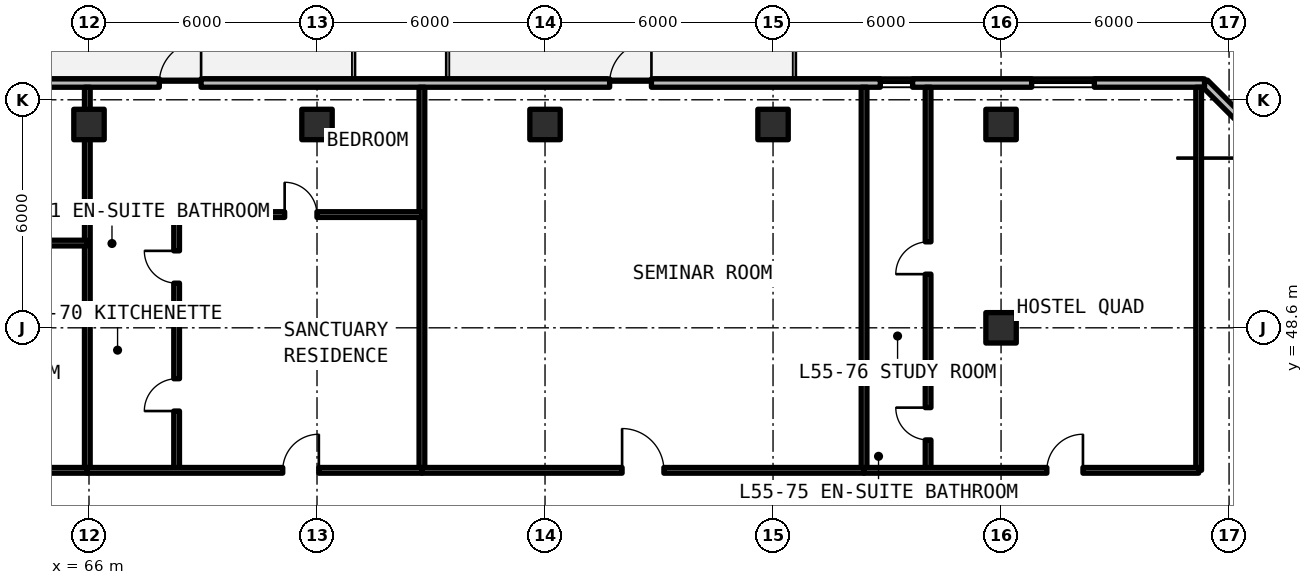
"""IFC4 building model, lengths in metres.
Left out: names, types, materials, properties, quantities, classifications, styles, units other than length and angle.
Written with IfcOpenShell. Run it as: python <this file> out.ifc"""

import sys

from ifc_helpers import new_model, si_unit, direction, frame, frame_2d, origin, origin_2d, place, context, subcontext, project, spatial, rectangle, extrude, element, fill, save


model = new_model("IFC4")
c1 = context("Model", 3, precision=1e-05, world=origin(), true_north=direction((0.0, 1.0)))
c2 = subcontext(c1, "Body", "Model", "MODEL_VIEW")
j1 = project(units=[si_unit("LENGTHUNIT", "METRE"), si_unit("PLANEANGLEUNIT", "RADIAN")], contexts=[c1])
p1 = place(None, origin())
s1 = spatial("IfcSite", under=j1, at=p1, CompositionType="ELEMENT")
p2 = place(p1, origin())
s2 = spatial("IfcBuilding", under=s1, at=p2, CompositionType="ELEMENT")
p3 = place(p2, frame((0.0, 0.0, 198.33)))
s3 = spatial("IfcBuildingStorey", under=s2, at=p3, CompositionType="ELEMENT", Elevation=198.33)
for number, where, z_axis, x_axis in (
    (1, (90.0, 48.6, 0.0), (0.0, 0.0, 1.0), (1.0, 0.0, 0.0)),
    (2, (66.0, 53.95, 0.0), (0.0, 0.0, 1.0), (1.0, 0.0, 0.0)),
    (3, (72.0, 53.95, 0.0), (0.0, 0.0, 1.0), (1.0, 0.0, 0.0)),
    (4, (78.0, 53.95, 0.0), (0.0, 0.0, 1.0), (1.0, 0.0, 0.0)),
    (5, (84.0, 53.95, 0.0), (0.0, 0.0, 1.0), (1.0, 0.0, 0.0)),
    (6, (90.0, 53.95, 0.0), (0.0, 0.0, 1.0), (1.0, 0.0, 0.0)),
):
    element("IfcColumn", number, at=place(p3, frame(where, z_axis=z_axis, x_axis=x_axis)), inside=s3, PredefinedType="COLUMN", context=c2, shape_type="SweptSolid", body=[
        extrude(rectangle(XDim=0.8, YDim=0.8, at=origin_2d()), origin(), (0.0, 0.0, 1.0), 3.3),
    ])
p4 = place(p3, frame((99.49, 50.904, 0.0), z_axis=(0.0, 0.0, 1.0), x_axis=(-0.707085909342, 0.707127652415, 0.0)))
e7 = element("IfcWall", 7, at=p4, inside=s3, PredefinedType="SOLIDWALL", context=c2, shape_type="SweptSolid", body=[
    extrude(rectangle(XDim=5.849, YDim=0.22, at=frame_2d((2.924, 0.0))), origin(), (0.0, 0.0, 1.0), 3.08),
])
p5 = place(p4, frame((1.224, 0.0, 0.78)))
e8 = element("IfcOpeningElement", 8, at=p5, cuts=e7, PredefinedType="OPENING", context=c2, shape_type="SweptSolid", body=[
    extrude(rectangle(XDim=3.4, YDim=1.66, at=frame_2d((1.7, 0.83))), frame((0.0, 0.12, 0.0), z_axis=(0.0, -1.0, 0.0), x_axis=(1.0, 0.0, 0.0)), (0.0, 0.0, 1.0), 0.24),
])
p6 = place(p3, frame((95.354, 55.04, 0.0), z_axis=(0.0, 0.0, 1.0), x_axis=(-1.0, 0.0, 0.0)))
e9 = element("IfcWall", 9, at=p6, inside=s3, PredefinedType="SOLIDWALL", context=c2, shape_type="SweptSolid", body=[
    extrude(rectangle(XDim=43.244, YDim=0.22, at=frame_2d((21.622, 0.0))), origin(), (0.0, 0.0, 1.0), 3.08),
])
p7 = place(p6, frame((26.404, 0.0, 0.0)))
e10 = element("IfcOpeningElement", 10, at=p7, cuts=e9, PredefinedType="OPENING", context=c2, shape_type="SweptSolid", body=[
    extrude(rectangle(XDim=1.1, YDim=2.15, at=frame_2d((0.55, 1.075))), frame((0.0, 0.12, 0.0), z_axis=(0.0, -1.0, 0.0), x_axis=(1.0, 0.0, 0.0)), (0.0, 0.0, 1.0), 0.24),
])
p8 = place(p6, frame((14.554, 0.0, 0.0)))
e11 = element("IfcOpeningElement", 11, at=p8, cuts=e9, PredefinedType="OPENING", context=c2, shape_type="SweptSolid", body=[
    extrude(rectangle(XDim=1.1, YDim=2.15, at=frame_2d((0.55, 1.075))), frame((0.0, 0.12, 0.0), z_axis=(0.0, -1.0, 0.0), x_axis=(1.0, 0.0, 0.0)), (0.0, 0.0, 1.0), 0.24),
])
p9 = place(p6, frame((38.802, 0.0, 0.78)))
e12 = element("IfcOpeningElement", 12, at=p9, cuts=e9, PredefinedType="OPENING", context=c2, shape_type="SweptSolid", body=[
    extrude(rectangle(XDim=1.65, YDim=1.66, at=frame_2d((0.825, 0.83))), frame((0.0, 0.12, 0.0), z_axis=(0.0, -1.0, 0.0), x_axis=(1.0, 0.0, 0.0)), (0.0, 0.0, 1.0), 0.24),
])
p10 = place(p6, frame((31.904, 0.0, 0.78)))
e13 = element("IfcOpeningElement", 13, at=p10, cuts=e9, PredefinedType="OPENING", context=c2, shape_type="SweptSolid", body=[
    extrude(rectangle(XDim=1.65, YDim=1.66, at=frame_2d((0.825, 0.83))), frame((0.0, 0.12, 0.0), z_axis=(0.0, -1.0, 0.0), x_axis=(1.0, 0.0, 0.0)), (0.0, 0.0, 1.0), 0.24),
])
p11 = place(p6, frame((7.682, 0.0, 0.78)))
e14 = element("IfcOpeningElement", 14, at=p11, cuts=e9, PredefinedType="OPENING", context=c2, shape_type="SweptSolid", body=[
    extrude(rectangle(XDim=0.85, YDim=1.65, at=frame_2d((0.425, 0.825))), frame((0.0, 0.12, 0.0), z_axis=(0.0, -1.0, 0.0), x_axis=(1.0, 0.0, 0.0)), (0.0, 0.0, 1.0), 0.24),
])
p12 = place(p6, frame((2.899, 0.0, 0.78)))
e15 = element("IfcOpeningElement", 15, at=p12, cuts=e9, PredefinedType="OPENING", context=c2, shape_type="SweptSolid", body=[
    extrude(rectangle(XDim=1.65, YDim=1.66, at=frame_2d((0.825, 0.83))), frame((0.0, 0.12, 0.0), z_axis=(0.0, -1.0, 0.0), x_axis=(1.0, 0.0, 0.0)), (0.0, 0.0, 1.0), 0.24),
])
for number, where, z_axis, x_axis in (
    (16, (95.2, 44.85, 0.0), (0.0, 0.0, 1.0), (0.0, 1.0, 0.0)),
    (17, (65.956, 44.85, 0.0), (0.0, 0.0, 1.0), (0.0, 1.0, 0.0)),
):
    element("IfcWall", number, at=place(p3, frame(where, z_axis=z_axis, x_axis=x_axis)), inside=s3, PredefinedType="SOLIDWALL", context=c2, shape_type="SweptSolid", body=[
        extrude(rectangle(XDim=10.08, YDim=0.15, at=frame_2d((5.04, 0.0))), origin(), (0.0, 0.0, 1.0), 2.35),
    ])
p13 = place(p3, frame((52.12, 50.83, 0.0), z_axis=(0.0, 0.0, 1.0), x_axis=(1.0, 0.0, 0.0)))
e18 = element("IfcWall", 18, at=p13, inside=s3, PredefinedType="PARTITIONING", context=c2, shape_type="SweptSolid", body=[
    extrude(rectangle(XDim=13.836, YDim=0.15, at=frame_2d((6.918, 0.0))), origin(), (0.0, 0.0, 1.0), 2.35),
])
p14 = place(p13, frame((5.073, 0.0, 0.0)))
e19 = element("IfcOpeningElement", 19, at=p14, cuts=e18, PredefinedType="OPENING", context=c2, shape_type="SweptSolid", body=[
    extrude(rectangle(XDim=0.85, YDim=2.1, at=frame_2d((0.425, 1.05))), frame((0.0, 0.085, 0.0), z_axis=(0.0, -1.0, 0.0), x_axis=(1.0, 0.0, 0.0)), (0.0, 0.0, 1.0), 0.17),
])
p15 = place(p13, frame((10.09, 0.0, 0.0)))
e20 = element("IfcOpeningElement", 20, at=p15, cuts=e18, PredefinedType="OPENING", context=c2, shape_type="SweptSolid", body=[
    extrude(rectangle(XDim=0.85, YDim=2.1, at=frame_2d((0.425, 1.05))), frame((0.0, 0.085, 0.0), z_axis=(0.0, -1.0, 0.0), x_axis=(1.0, 0.0, 0.0)), (0.0, 0.0, 1.0), 0.17),
])
p16 = place(p3, frame((52.12, 44.85, 0.0), z_axis=(0.0, 0.0, 1.0), x_axis=(1.0, 0.0, 0.0)))
e21 = element("IfcWall", 21, at=p16, inside=s3, PredefinedType="SOLIDWALL", context=c2, shape_type="SweptSolid", body=[
    extrude(rectangle(XDim=13.836, YDim=0.15, at=frame_2d((6.918, 0.0))), origin(), (0.0, 0.0, 1.0), 2.35),
])
p17 = place(p16, frame((8.383, 0.0, 0.0)))
e22 = element("IfcOpeningElement", 22, at=p17, cuts=e21, PredefinedType="OPENING", context=c2, shape_type="SweptSolid", body=[
    extrude(rectangle(XDim=0.95, YDim=2.15, at=frame_2d((0.475, 1.075))), frame((0.0, 0.085, 0.0), z_axis=(0.0, -1.0, 0.0), x_axis=(1.0, 0.0, 0.0)), (0.0, 0.0, 1.0), 0.17),
])
p18 = place(p3, frame((74.76, 44.85, 0.0), z_axis=(0.0, 0.0, 1.0), x_axis=(0.0, 1.0, 0.0)))
e23 = element("IfcWall", 23, at=p18, inside=s3, PredefinedType="SOLIDWALL", context=c2, shape_type="SweptSolid", body=[
    extrude(rectangle(XDim=10.08, YDim=0.15, at=frame_2d((5.04, 0.0))), origin(), (0.0, 0.0, 1.0), 2.35),
])
p19 = place(p3, frame((65.956, 48.82, 0.0), z_axis=(0.0, 0.0, 1.0), x_axis=(1.0, 0.0, 0.0)))
e24 = element("IfcWall", 24, at=p19, inside=s3, PredefinedType="PARTITIONING", context=c2, shape_type="SweptSolid", body=[
    extrude(rectangle(XDim=2.35, YDim=0.15, at=frame_2d((1.175, 0.0))), origin(), (0.0, 0.0, 1.0), 2.35),
])
p20 = place(p3, frame((68.306, 44.85, 0.0), z_axis=(0.0, 0.0, 1.0), x_axis=(0.0, 1.0, 0.0)))
e25 = element("IfcWall", 25, at=p20, inside=s3, PredefinedType="PARTITIONING", context=c2, shape_type="SweptSolid", body=[
    extrude(rectangle(XDim=6.729, YDim=0.15, at=frame_2d((3.365, 0.0))), origin(), (0.0, 0.0, 1.0), 2.35),
])
p21 = place(p20, frame((1.56, 0.0, 0.0)))
e26 = element("IfcOpeningElement", 26, at=p21, cuts=e25, PredefinedType="OPENING", context=c2, shape_type="SweptSolid", body=[
    extrude(rectangle(XDim=0.85, YDim=2.1, at=frame_2d((0.425, 1.05))), frame((0.0, 0.085, 0.0), z_axis=(0.0, -1.0, 0.0), x_axis=(1.0, 0.0, 0.0)), (0.0, 0.0, 1.0), 0.17),
])
p22 = place(p20, frame((4.925, 0.0, 0.0)))
e27 = element("IfcOpeningElement", 27, at=p22, cuts=e25, PredefinedType="OPENING", context=c2, shape_type="SweptSolid", body=[
    extrude(rectangle(XDim=0.85, YDim=2.1, at=frame_2d((0.425, 1.05))), frame((0.0, 0.085, 0.0), z_axis=(0.0, -1.0, 0.0), x_axis=(1.0, 0.0, 0.0)), (0.0, 0.0, 1.0), 0.17),
])
p23 = place(p3, frame((65.956, 51.58, 0.0), z_axis=(0.0, 0.0, 1.0), x_axis=(1.0, 0.0, 0.0)))
e28 = element("IfcWall", 28, at=p23, inside=s3, PredefinedType="PARTITIONING", context=c2, shape_type="SweptSolid", body=[
    extrude(rectangle(XDim=8.805, YDim=0.15, at=frame_2d((4.402, 0.0))), origin(), (0.0, 0.0, 1.0), 2.35),
])
p24 = place(p23, frame((5.192, 0.0, 0.0)))
e29 = element("IfcOpeningElement", 29, at=p24, cuts=e28, PredefinedType="OPENING", context=c2, shape_type="SweptSolid", body=[
    extrude(rectangle(XDim=0.85, YDim=2.1, at=frame_2d((0.425, 1.05))), frame((0.0, 0.085, 0.0), z_axis=(0.0, -1.0, 0.0), x_axis=(1.0, 0.0, 0.0)), (0.0, 0.0, 1.0), 0.17),
])
p25 = place(p3, frame((65.956, 44.85, 0.0), z_axis=(0.0, 0.0, 1.0), x_axis=(1.0, 0.0, 0.0)))
e30 = element("IfcWall", 30, at=p25, inside=s3, PredefinedType="SOLIDWALL", context=c2, shape_type="SweptSolid", body=[
    extrude(rectangle(XDim=8.805, YDim=0.15, at=frame_2d((4.402, 0.0))), origin(), (0.0, 0.0, 1.0), 2.35),
])
p26 = place(p25, frame((5.142, 0.0, 0.0)))
e31 = element("IfcOpeningElement", 31, at=p26, cuts=e30, PredefinedType="OPENING", context=c2, shape_type="SweptSolid", body=[
    extrude(rectangle(XDim=0.95, YDim=2.15, at=frame_2d((0.475, 1.075))), frame((0.0, 0.085, 0.0), z_axis=(0.0, -1.0, 0.0), x_axis=(1.0, 0.0, 0.0)), (0.0, 0.0, 1.0), 0.17),
])
p27 = place(p3, frame((86.395, 44.85, 0.0), z_axis=(0.0, 0.0, 1.0), x_axis=(0.0, 1.0, 0.0)))
e32 = element("IfcWall", 32, at=p27, inside=s3, PredefinedType="SOLIDWALL", context=c2, shape_type="SweptSolid", body=[
    extrude(rectangle(XDim=10.08, YDim=0.15, at=frame_2d((5.04, 0.0))), origin(), (0.0, 0.0, 1.0), 2.35),
])
p28 = place(p3, frame((74.76, 44.85, 0.0), z_axis=(0.0, 0.0, 1.0), x_axis=(1.0, 0.0, 0.0)))
e33 = element("IfcWall", 33, at=p28, inside=s3, PredefinedType="SOLIDWALL", context=c2, shape_type="SweptSolid", body=[
    extrude(rectangle(XDim=11.635, YDim=0.15, at=frame_2d((5.817, 0.0))), origin(), (0.0, 0.0, 1.0), 2.35),
])
p29 = place(p28, frame((5.267, 0.0, 0.0)))
e34 = element("IfcOpeningElement", 34, at=p29, cuts=e33, PredefinedType="OPENING", context=c2, shape_type="SweptSolid", body=[
    extrude(rectangle(XDim=1.1, YDim=2.15, at=frame_2d((0.55, 1.075))), frame((0.0, 0.085, 0.0), z_axis=(0.0, -1.0, 0.0), x_axis=(1.0, 0.0, 0.0)), (0.0, 0.0, 1.0), 0.17),
])
p30 = place(p3, frame((86.395, 47.3, 0.0), z_axis=(0.0, 0.0, 1.0), x_axis=(1.0, 0.0, 0.0)))
e35 = element("IfcWall", 35, at=p30, inside=s3, PredefinedType="PARTITIONING", context=c2, shape_type="SweptSolid", body=[
    extrude(rectangle(XDim=1.685, YDim=0.15, at=frame_2d((0.842, 0.0))), origin(), (0.0, 0.0, 1.0), 2.35),
])
p31 = place(p3, frame((88.08, 44.85, 0.0), z_axis=(0.0, 0.0, 1.0), x_axis=(0.0, 1.0, 0.0)))
e36 = element("IfcWall", 36, at=p31, inside=s3, PredefinedType="PARTITIONING", context=c2, shape_type="SweptSolid", body=[
    extrude(rectangle(XDim=10.08, YDim=0.15, at=frame_2d((5.04, 0.0))), origin(), (0.0, 0.0, 1.0), 2.35),
])
p32 = place(p31, frame((0.8, 0.0, 0.0)))
e37 = element("IfcOpeningElement", 37, at=p32, cuts=e36, PredefinedType="OPENING", context=c2, shape_type="SweptSolid", body=[
    extrude(rectangle(XDim=0.85, YDim=2.1, at=frame_2d((0.425, 1.05))), frame((0.0, 0.085, 0.0), z_axis=(0.0, -1.0, 0.0), x_axis=(1.0, 0.0, 0.0)), (0.0, 0.0, 1.0), 0.17),
])
p33 = place(p31, frame((5.162, 0.0, 0.0)))
e38 = element("IfcOpeningElement", 38, at=p33, cuts=e36, PredefinedType="OPENING", context=c2, shape_type="SweptSolid", body=[
    extrude(rectangle(XDim=0.85, YDim=2.1, at=frame_2d((0.425, 1.05))), frame((0.0, 0.085, 0.0), z_axis=(0.0, -1.0, 0.0), x_axis=(1.0, 0.0, 0.0)), (0.0, 0.0, 1.0), 0.17),
])
p34 = place(p3, frame((86.395, 44.85, 0.0), z_axis=(0.0, 0.0, 1.0), x_axis=(1.0, 0.0, 0.0)))
e39 = element("IfcWall", 39, at=p34, inside=s3, PredefinedType="SOLIDWALL", context=c2, shape_type="SweptSolid", body=[
    extrude(rectangle(XDim=8.805, YDim=0.15, at=frame_2d((4.402, 0.0))), origin(), (0.0, 0.0, 1.0), 2.35),
])
p35 = place(p34, frame((4.81, 0.0, 0.0)))
e40 = element("IfcOpeningElement", 40, at=p35, cuts=e39, PredefinedType="OPENING", context=c2, shape_type="SweptSolid", body=[
    extrude(rectangle(XDim=0.95, YDim=2.15, at=frame_2d((0.475, 1.075))), frame((0.0, 0.085, 0.0), z_axis=(0.0, -1.0, 0.0), x_axis=(1.0, 0.0, 0.0)), (0.0, 0.0, 1.0), 0.17),
])
p36 = place(p7, frame((1.1, 0.0, 0.0), z_axis=(0.0, 0.0, 1.0), x_axis=(-1.0, 0.0, 0.0)))
e41 = element("IfcDoor", 41, at=p36, inside=s3, OperationType="SINGLE_SWING_RIGHT", PredefinedType="DOOR", context=c2, shape_type="SweptSolid", body=[
    extrude(rectangle(XDim=1.1, YDim=2.15, at=frame_2d((0.55, 1.075))), frame((0.0, 0.025, 0.0), z_axis=(0.0, -1.0, 0.0), x_axis=(1.0, 0.0, 0.0)), (0.0, 0.0, 1.0), 0.05),
])
fill(e10, e41)
p37 = place(p8, frame((1.1, 0.0, 0.0), z_axis=(0.0, 0.0, 1.0), x_axis=(-1.0, 0.0, 0.0)))
e42 = element("IfcDoor", 42, at=p37, inside=s3, OperationType="SINGLE_SWING_LEFT", PredefinedType="DOOR", context=c2, shape_type="SweptSolid", body=[
    extrude(rectangle(XDim=1.1, YDim=2.15, at=frame_2d((0.55, 1.075))), frame((0.0, 0.025, 0.0), z_axis=(0.0, -1.0, 0.0), x_axis=(1.0, 0.0, 0.0)), (0.0, 0.0, 1.0), 0.05),
])
fill(e11, e42)
p38 = place(p11, origin())
e43 = element("IfcWindow", 43, at=p38, inside=s3, PartitioningType="SINGLE_PANEL", PredefinedType="WINDOW", context=c2, shape_type="SweptSolid", body=[
    extrude(rectangle(XDim=0.85, YDim=1.65, at=frame_2d((0.425, 0.825))), frame((0.0, 0.03, 0.0), z_axis=(0.0, -1.0, 0.0), x_axis=(1.0, 0.0, 0.0)), (0.0, 0.0, 1.0), 0.06),
])
fill(e14, e43)
p39 = place(p12, origin())
e44 = element("IfcWindow", 44, at=p39, inside=s3, PartitioningType="SINGLE_PANEL", PredefinedType="WINDOW", context=c2, shape_type="SweptSolid", body=[
    extrude(rectangle(XDim=1.65, YDim=1.66, at=frame_2d((0.825, 0.83))), frame((0.0, 0.03, 0.0), z_axis=(0.0, -1.0, 0.0), x_axis=(1.0, 0.0, 0.0)), (0.0, 0.0, 1.0), 0.06),
])
fill(e15, e44)
p40 = place(p21, origin())
e45 = element("IfcDoor", 45, at=p40, inside=s3, OperationType="SINGLE_SWING_LEFT", PredefinedType="DOOR", context=c2, shape_type="SweptSolid", body=[
    extrude(rectangle(XDim=0.85, YDim=2.1, at=frame_2d((0.425, 1.05))), frame((0.0, 0.025, 0.0), z_axis=(0.0, -1.0, 0.0), x_axis=(1.0, 0.0, 0.0)), (0.0, 0.0, 1.0), 0.05),
])
fill(e26, e45)
p41 = place(p22, origin())
e46 = element("IfcDoor", 46, at=p41, inside=s3, OperationType="SINGLE_SWING_RIGHT", PredefinedType="DOOR", context=c2, shape_type="SweptSolid", body=[
    extrude(rectangle(XDim=0.85, YDim=2.1, at=frame_2d((0.425, 1.05))), frame((0.0, 0.025, 0.0), z_axis=(0.0, -1.0, 0.0), x_axis=(1.0, 0.0, 0.0)), (0.0, 0.0, 1.0), 0.05),
])
fill(e27, e46)
p42 = place(p24, origin())
e47 = element("IfcDoor", 47, at=p42, inside=s3, OperationType="SINGLE_SWING_LEFT", PredefinedType="DOOR", context=c2, shape_type="SweptSolid", body=[
    extrude(rectangle(XDim=0.85, YDim=2.1, at=frame_2d((0.425, 1.05))), frame((0.0, 0.025, 0.0), z_axis=(0.0, -1.0, 0.0), x_axis=(1.0, 0.0, 0.0)), (0.0, 0.0, 1.0), 0.05),
])
fill(e29, e47)
p43 = place(p26, origin())
e48 = element("IfcDoor", 48, at=p43, inside=s3, OperationType="SINGLE_SWING_RIGHT", PredefinedType="DOOR", context=c2, shape_type="SweptSolid", body=[
    extrude(rectangle(XDim=0.95, YDim=2.15, at=frame_2d((0.475, 1.075))), frame((0.0, 0.025, 0.0), z_axis=(0.0, -1.0, 0.0), x_axis=(1.0, 0.0, 0.0)), (0.0, 0.0, 1.0), 0.05),
])
fill(e31, e48)
p44 = place(p29, origin())
e49 = element("IfcDoor", 49, at=p44, inside=s3, OperationType="SINGLE_SWING_LEFT", PredefinedType="DOOR", context=c2, shape_type="SweptSolid", body=[
    extrude(rectangle(XDim=1.1, YDim=2.15, at=frame_2d((0.55, 1.075))), frame((0.0, 0.025, 0.0), z_axis=(0.0, -1.0, 0.0), x_axis=(1.0, 0.0, 0.0)), (0.0, 0.0, 1.0), 0.05),
])
fill(e34, e49)
p45 = place(p32, origin())
e50 = element("IfcDoor", 50, at=p45, inside=s3, OperationType="SINGLE_SWING_RIGHT", PredefinedType="DOOR", context=c2, shape_type="SweptSolid", body=[
    extrude(rectangle(XDim=0.85, YDim=2.1, at=frame_2d((0.425, 1.05))), frame((0.0, 0.025, 0.0), z_axis=(0.0, -1.0, 0.0), x_axis=(1.0, 0.0, 0.0)), (0.0, 0.0, 1.0), 0.05),
])
fill(e37, e50)
p46 = place(p33, origin())
e51 = element("IfcDoor", 51, at=p46, inside=s3, OperationType="SINGLE_SWING_LEFT", PredefinedType="DOOR", context=c2, shape_type="SweptSolid", body=[
    extrude(rectangle(XDim=0.85, YDim=2.1, at=frame_2d((0.425, 1.05))), frame((0.0, 0.025, 0.0), z_axis=(0.0, -1.0, 0.0), x_axis=(1.0, 0.0, 0.0)), (0.0, 0.0, 1.0), 0.05),
])
fill(e38, e51)
p47 = place(p35, origin())
e52 = element("IfcDoor", 52, at=p47, inside=s3, OperationType="SINGLE_SWING_RIGHT", PredefinedType="DOOR", context=c2, shape_type="SweptSolid", body=[
    extrude(rectangle(XDim=0.95, YDim=2.15, at=frame_2d((0.475, 1.075))), frame((0.0, 0.025, 0.0), z_axis=(0.0, -1.0, 0.0), x_axis=(1.0, 0.0, 0.0)), (0.0, 0.0, 1.0), 0.05),
])
fill(e40, e52)
save(model, sys.argv[1])
